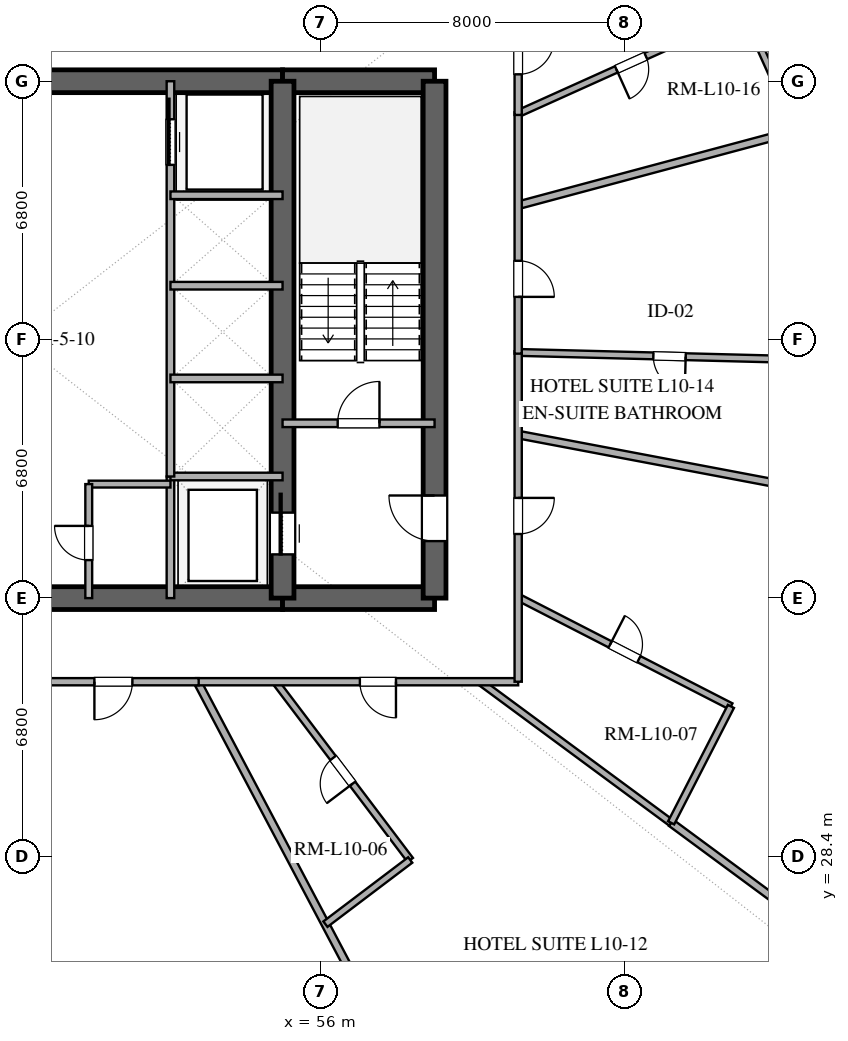
"""IFC4 building model, lengths in metres.
Left out: names, types, materials, properties, quantities, classifications, styles, units other than length and angle.
Written with IfcOpenShell. Run it as: python <this file> out.ifc"""

import sys

from ifc_helpers import new_model, si_unit, direction, frame, frame_2d, origin, place, context, subcontext, project, spatial, rectangle, extrude, element, fill, save


model = new_model("IFC4")
c1 = context("Model", 3, precision=1e-05, world=origin(), true_north=direction((0.0, 1.0)))
c2 = subcontext(c1, "Body", "Model", "MODEL_VIEW")
j1 = project(units=[si_unit("LENGTHUNIT", "METRE"), si_unit("PLANEANGLEUNIT", "RADIAN")], contexts=[c1])
p1 = place(None, origin())
s1 = spatial("IfcSite", under=j1, at=p1, CompositionType="ELEMENT")
p2 = place(p1, origin())
s2 = spatial("IfcBuilding", under=s1, at=p2, CompositionType="ELEMENT")
p3 = place(p2, frame((0.0, 0.0, 46.2)))
s3 = spatial("IfcBuildingStorey", under=s2, at=p3, CompositionType="ELEMENT", Elevation=46.2)
p4 = place(p3, frame((41.0, 35.2, 0.0), z_axis=(0.0, 0.0, 1.0), x_axis=(1.0, 0.0, 0.0)))
e1 = element("IfcWall", 1, at=p4, inside=s3, PredefinedType="SHEAR", context=c2, shape_type="SweptSolid", body=[
    extrude(rectangle(XDim=14.0, YDim=0.6, at=frame_2d((7.0, 0.0))), origin(), (0.0, 0.0, 1.0), 3.38),
])
p5 = place(p4, frame((6.1, 0.0, 0.0)))
e2 = element("IfcOpeningElement", 2, at=p5, cuts=e1, PredefinedType="OPENING", context=c2, shape_type="SweptSolid", body=[
    extrude(rectangle(XDim=1.8, YDim=2.25, at=frame_2d((0.9, 1.125))), frame((0.0, 0.31, 0.0), z_axis=(0.0, -1.0, 0.0), x_axis=(1.0, 0.0, 0.0)), (0.0, 0.0, 1.0), 0.62),
])
p6 = place(p3, frame((55.0, 35.2, 0.0), z_axis=(0.0, 0.0, 1.0), x_axis=(1.0, 0.0, 0.0)))
e3 = element("IfcWall", 3, at=p6, inside=s3, PredefinedType="SHEAR", context=c2, shape_type="SweptSolid", body=[
    extrude(rectangle(XDim=4.0, YDim=0.6, at=frame_2d((2.0, 0.0))), origin(), (0.0, 0.0, 1.0), 3.38),
])
p7 = place(p3, frame((41.0, 48.8, 0.0), z_axis=(0.0, 0.0, 1.0), x_axis=(1.0, 0.0, 0.0)))
e4 = element("IfcWall", 4, at=p7, inside=s3, PredefinedType="SHEAR", context=c2, shape_type="SweptSolid", body=[
    extrude(rectangle(XDim=14.0, YDim=0.6, at=frame_2d((7.0, 0.0))), origin(), (0.0, 0.0, 1.0), 3.38),
])
p8 = place(p7, frame((6.1, 0.0, 0.0)))
e5 = element("IfcOpeningElement", 5, at=p8, cuts=e4, PredefinedType="OPENING", context=c2, shape_type="SweptSolid", body=[
    extrude(rectangle(XDim=1.8, YDim=2.25, at=frame_2d((0.9, 1.125))), frame((0.0, 0.31, 0.0), z_axis=(0.0, -1.0, 0.0), x_axis=(1.0, 0.0, 0.0)), (0.0, 0.0, 1.0), 0.62),
])
p9 = place(p3, frame((55.0, 48.8, 0.0), z_axis=(0.0, 0.0, 1.0), x_axis=(1.0, 0.0, 0.0)))
e6 = element("IfcWall", 6, at=p9, inside=s3, PredefinedType="SHEAR", context=c2, shape_type="SweptSolid", body=[
    extrude(rectangle(XDim=4.0, YDim=0.6, at=frame_2d((2.0, 0.0))), origin(), (0.0, 0.0, 1.0), 3.38),
])
p10 = place(p3, frame((59.0, 35.2, 0.0), z_axis=(0.0, 0.0, 1.0), x_axis=(0.0, 1.0, 0.0)))
e7 = element("IfcWall", 7, at=p10, inside=s3, PredefinedType="SHEAR", context=c2, shape_type="SweptSolid", body=[
    extrude(rectangle(XDim=13.6, YDim=0.6, at=frame_2d((6.8, 0.0))), origin(), (0.0, 0.0, 1.0), 3.38),
])
p11 = place(p10, frame((1.5, 0.0, 0.0)))
e8 = element("IfcOpeningElement", 8, at=p11, cuts=e7, PredefinedType="OPENING", context=c2, shape_type="SweptSolid", body=[
    extrude(rectangle(XDim=1.2, YDim=2.15, at=frame_2d((0.6, 1.075))), frame((0.0, 0.31, 0.0), z_axis=(0.0, -1.0, 0.0), x_axis=(1.0, 0.0, 0.0)), (0.0, 0.0, 1.0), 0.62),
])
p12 = place(p3, frame((55.0, 35.2, 0.0), z_axis=(0.0, 0.0, 1.0), x_axis=(0.0, 1.0, 0.0)))
e9 = element("IfcWall", 9, at=p12, inside=s3, PredefinedType="SHEAR", context=c2, shape_type="SweptSolid", body=[
    extrude(rectangle(XDim=13.6, YDim=0.6, at=frame_2d((6.8, 0.0))), origin(), (0.0, 0.0, 1.0), 3.38),
])
p13 = place(p12, frame((1.15, 0.0, 0.0)))
e10 = element("IfcOpeningElement", 10, at=p13, cuts=e9, PredefinedType="OPENING", context=c2, shape_type="SweptSolid", body=[
    extrude(rectangle(XDim=1.1, YDim=2.2, at=frame_2d((0.55, 1.1))), frame((0.0, 0.31, 0.0), z_axis=(0.0, -1.0, 0.0), x_axis=(1.0, 0.0, 0.0)), (0.0, 0.0, 1.0), 0.62),
])
p14 = place(p3, frame((55.0, 39.8, 0.0), z_axis=(0.0, 0.0, 1.0), x_axis=(1.0, 0.0, 0.0)))
e11 = element("IfcWall", 11, at=p14, inside=s3, PredefinedType="SOLIDWALL", context=c2, shape_type="SweptSolid", body=[
    extrude(rectangle(XDim=4.0, YDim=0.2, at=frame_2d((2.0, 0.0))), origin(), (0.0, 0.0, 1.0), 2.74),
])
p15 = place(p14, frame((1.45, 0.0, 0.0)))
e12 = element("IfcOpeningElement", 12, at=p15, cuts=e11, PredefinedType="OPENING", context=c2, shape_type="SweptSolid", body=[
    extrude(rectangle(XDim=1.1, YDim=2.15, at=frame_2d((0.55, 1.075))), frame((0.0, 0.11, 0.0), z_axis=(0.0, -1.0, 0.0), x_axis=(1.0, 0.0, 0.0)), (0.0, 0.0, 1.0), 0.22),
])
p16 = place(p3, frame((52.05, 35.2, 0.0), z_axis=(0.0, 0.0, 1.0), x_axis=(0.0, 1.0, 0.0)))
e13 = element("IfcWall", 13, at=p16, inside=s3, PredefinedType="SOLIDWALL", context=c2, shape_type="SweptSolid", body=[
    extrude(rectangle(XDim=3.2, YDim=0.2, at=frame_2d((1.6, 0.0))), origin(), (0.0, 0.0, 1.0), 2.74),
])
p17 = place(p3, frame((52.05, 38.4, 0.0), z_axis=(0.0, 0.0, 1.0), x_axis=(1.0, 0.0, 0.0)))
e14 = element("IfcWall", 14, at=p17, inside=s3, PredefinedType="SOLIDWALL", context=c2, shape_type="SweptSolid", body=[
    extrude(rectangle(XDim=2.95, YDim=0.2, at=frame_2d((1.475, 0.0))), origin(), (0.0, 0.0, 1.0), 2.74),
])
p18 = place(p3, frame((52.05, 38.4, 0.0), z_axis=(0.0, 0.0, 1.0), x_axis=(0.0, 1.0, 0.0)))
e15 = element("IfcWall", 15, at=p18, inside=s3, PredefinedType="SOLIDWALL", context=c2, shape_type="SweptSolid", body=[
    extrude(rectangle(XDim=10.4, YDim=0.2, at=frame_2d((5.2, 0.0))), origin(), (0.0, 0.0, 1.0), 2.74),
])
p19 = place(p18, frame((8.2, 0.0, 0.0)))
e16 = element("IfcOpeningElement", 16, at=p19, cuts=e15, PredefinedType="OPENING", context=c2, shape_type="SweptSolid", body=[
    extrude(rectangle(XDim=1.2, YDim=2.2, at=frame_2d((0.6, 1.1))), frame((0.0, 0.11, 0.0), z_axis=(0.0, -1.0, 0.0), x_axis=(1.0, 0.0, 0.0)), (0.0, 0.0, 1.0), 0.22),
])
for number, where, z_axis, x_axis in (
    (17, (52.05, 40.98, 0.0), (0.0, 0.0, 1.0), (1.0, 0.0, 0.0)),
    (18, (52.05, 43.42, 0.0), (0.0, 0.0, 1.0), (1.0, 0.0, 0.0)),
    (19, (52.05, 45.8, 0.0), (0.0, 0.0, 1.0), (1.0, 0.0, 0.0)),
):
    element("IfcWall", number, at=place(p3, frame(where, z_axis=z_axis, x_axis=x_axis)), inside=s3, PredefinedType="SOLIDWALL", context=c2, shape_type="SweptSolid", body=[
        extrude(rectangle(XDim=2.95, YDim=0.2, at=frame_2d((1.475, 0.0))), origin(), (0.0, 0.0, 1.0), 2.74),
    ])
p20 = place(p3, frame((49.9, 38.2, 0.0), z_axis=(0.0, 0.0, 1.0), x_axis=(1.0, 0.0, 0.0)))
e20 = element("IfcWall", 20, at=p20, inside=s3, PredefinedType="PLUMBINGWALL", context=c2, shape_type="SweptSolid", body=[
    extrude(rectangle(XDim=2.15, YDim=0.18, at=frame_2d((1.075, 0.0))), origin(), (0.0, 0.0, 1.0), 2.74),
])
p21 = place(p3, frame((49.9, 35.2, 0.0), z_axis=(0.0, 0.0, 1.0), x_axis=(0.0, 1.0, 0.0)))
e21 = element("IfcWall", 21, at=p21, inside=s3, PredefinedType="PLUMBINGWALL", context=c2, shape_type="SweptSolid", body=[
    extrude(rectangle(XDim=3.0, YDim=0.18, at=frame_2d((1.5, 0.0))), origin(), (0.0, 0.0, 1.0), 2.74),
])
p22 = place(p21, frame((1.0, 0.0, 0.0)))
e22 = element("IfcOpeningElement", 22, at=p22, cuts=e21, PredefinedType="OPENING", context=c2, shape_type="SweptSolid", body=[
    extrude(rectangle(XDim=0.9, YDim=2.1, at=frame_2d((0.45, 1.05))), frame((0.0, 0.1, 0.0), z_axis=(0.0, -1.0, 0.0), x_axis=(1.0, 0.0, 0.0)), (0.0, 0.0, 1.0), 0.2),
])
p23 = place(p3, frame((48.893, 18.134, 0.0), z_axis=(0.0, 0.0, 1.0), x_axis=(-0.037384345878, 0.999300961014, 0.0)))
e23 = element("IfcWall", 23, at=p23, inside=s3, PredefinedType="PARTITIONING", context=c2, shape_type="SweptSolid", body=[
    extrude(rectangle(XDim=14.877, YDim=0.2, at=frame_2d((7.438, 0.0))), origin(), (0.0, 0.0, 1.0), 2.74),
])
p24 = place(p3, frame((61.2, 45.537, 0.0), z_axis=(0.0, 0.0, 1.0), x_axis=(0.965922233104, 0.258832454679, 0.0)))
e24 = element("IfcWall", 24, at=p24, inside=s3, PredefinedType="PARTITIONING", context=c2, shape_type="SweptSolid", body=[
    extrude(rectangle(XDim=16.377, YDim=0.2, at=frame_2d((8.189, 0.0))), origin(), (0.0, 0.0, 1.0), 2.74),
])
p25 = place(p3, frame((61.2, 39.502, 0.0), z_axis=(0.0, 0.0, 1.0), x_axis=(0.982565603173, -0.185916205484, 0.0)))
e25 = element("IfcWall", 25, at=p25, inside=s3, PredefinedType="PARTITIONING", context=c2, shape_type="SweptSolid", body=[
    extrude(rectangle(XDim=16.616, YDim=0.2, at=frame_2d((8.308, 0.0))), origin(), (0.0, 0.0, 1.0), 2.74),
])
p26 = place(p3, frame((69.165, 41.462, 0.0), z_axis=(0.0, 0.0, 1.0), x_axis=(-0.999676564425, 0.025431605115, 0.0)))
e26 = element("IfcWall", 26, at=p26, inside=s3, PredefinedType="PLUMBINGWALL", context=c2, shape_type="SweptSolid", body=[
    extrude(rectangle(XDim=7.968, YDim=0.18, at=frame_2d((3.984, 0.0))), origin(), (0.0, 0.0, 1.0), 2.74),
])
p27 = place(p26, frame((3.559, 0.0, 0.0)))
e27 = element("IfcOpeningElement", 27, at=p27, cuts=e26, PredefinedType="OPENING", context=c2, shape_type="SweptSolid", body=[
    extrude(rectangle(XDim=0.85, YDim=2.1, at=frame_2d((0.425, 1.05))), frame((0.0, 0.1, 0.0), z_axis=(0.0, -1.0, 0.0), x_axis=(1.0, 0.0, 0.0)), (0.0, 0.0, 1.0), 0.2),
])
p28 = place(p3, frame((52.757, 33.0, 0.0), z_axis=(0.0, 0.0, 1.0), x_axis=(0.467270516294, -0.884114395654, 0.0)))
e28 = element("IfcWall", 28, at=p28, inside=s3, PredefinedType="PARTITIONING", context=c2, shape_type="SweptSolid", body=[
    extrude(rectangle(XDim=14.96, YDim=0.2, at=frame_2d((7.48, 0.0))), origin(), (0.0, 0.0, 1.0), 2.74),
])
p29 = place(p3, frame((70.538, 25.366, 0.0), z_axis=(0.0, 0.0, 1.0), x_axis=(-0.804616980297, 0.593794168898, 0.0)))
e29 = element("IfcWall", 29, at=p29, inside=s3, PredefinedType="PARTITIONING", context=c2, shape_type="SweptSolid", body=[
    extrude(rectangle(XDim=6.603, YDim=0.2, at=frame_2d((3.302, 0.0))), origin(), (0.0, 0.0, 1.0), 2.74),
])
p30 = place(p3, frame((67.143, 50.626, 0.0), z_axis=(0.0, 0.0, 1.0), x_axis=(-0.911702033518, -0.410852044025, 0.0)))
e30 = element("IfcWall", 30, at=p30, inside=s3, PredefinedType="PLUMBINGWALL", context=c2, shape_type="SweptSolid", body=[
    extrude(rectangle(XDim=6.519, YDim=0.18, at=frame_2d((3.259, 0.0))), origin(), (0.0, 0.0, 1.0), 2.74),
])
p31 = place(p30, frame((2.834, 0.0, 0.0)))
e31 = element("IfcOpeningElement", 31, at=p31, cuts=e30, PredefinedType="OPENING", context=c2, shape_type="SweptSolid", body=[
    extrude(rectangle(XDim=0.85, YDim=2.1, at=frame_2d((0.425, 1.05))), frame((0.0, 0.1, 0.0), z_axis=(0.0, -1.0, 0.0), x_axis=(1.0, 0.0, 0.0)), (0.0, 0.0, 1.0), 0.2),
])
p32 = place(p3, frame((61.2, 35.224, 0.0), z_axis=(0.0, 0.0, 1.0), x_axis=(0.889651376734, -0.456640370395, 0.0)))
e32 = element("IfcWall", 32, at=p32, inside=s3, PredefinedType="PLUMBINGWALL", context=c2, shape_type="SweptSolid", body=[
    extrude(rectangle(XDim=6.292, YDim=0.18, at=frame_2d((3.146, 0.0))), origin(), (0.0, 0.0, 1.0), 2.74),
])
p33 = place(p32, frame((2.721, 0.0, 0.0)))
e33 = element("IfcOpeningElement", 33, at=p33, cuts=e32, PredefinedType="OPENING", context=c2, shape_type="SweptSolid", body=[
    extrude(rectangle(XDim=0.85, YDim=2.1, at=frame_2d((0.425, 1.05))), frame((0.0, 0.1, 0.0), z_axis=(0.0, -1.0, 0.0), x_axis=(1.0, 0.0, 0.0)), (0.0, 0.0, 1.0), 0.2),
])
p34 = place(p3, frame((65.225, 29.287, 0.0), z_axis=(0.0, 0.0, 1.0), x_axis=(-0.804582519588, 0.593840861825, 0.0)))
e34 = element("IfcWall", 34, at=p34, inside=s3, PredefinedType="PLUMBINGWALL", context=c2, shape_type="SweptSolid", body=[
    extrude(rectangle(XDim=6.252, YDim=0.18, at=frame_2d((3.126, 0.0))), origin(), (0.0, 0.0, 1.0), 2.74),
])
p35 = place(p3, frame((58.36, 28.309, 0.0), z_axis=(0.0, 0.0, 1.0), x_axis=(-0.603401299207, 0.797437691682, 0.0)))
e35 = element("IfcWall", 35, at=p35, inside=s3, PredefinedType="PLUMBINGWALL", context=c2, shape_type="SweptSolid", body=[
    extrude(rectangle(XDim=5.882, YDim=0.18, at=frame_2d((2.941, 0.0))), origin(), (0.0, 0.0, 1.0), 2.74),
])
p36 = place(p35, frame((2.516, 0.0, 0.0)))
e36 = element("IfcOpeningElement", 36, at=p36, cuts=e35, PredefinedType="OPENING", context=c2, shape_type="SweptSolid", body=[
    extrude(rectangle(XDim=0.85, YDim=2.1, at=frame_2d((0.425, 1.05))), frame((0.0, 0.1, 0.0), z_axis=(0.0, -1.0, 0.0), x_axis=(1.0, 0.0, 0.0)), (0.0, 0.0, 1.0), 0.2),
])
p37 = place(p3, frame((61.2, 33.0, 0.0), z_axis=(0.0, 0.0, 1.0), x_axis=(-1.0, 0.0, 0.0)))
e37 = element("IfcWall", 37, at=p37, inside=s3, PredefinedType="PARTITIONING", context=c2, shape_type="SweptSolid", body=[
    extrude(rectangle(XDim=8.479, YDim=0.19, at=frame_2d((4.24, 0.0))), origin(), (0.0, 0.0, 1.0), 2.74),
])
p38 = place(p37, frame((3.216, 0.0, 0.0)))
e38 = element("IfcOpeningElement", 38, at=p38, cuts=e37, PredefinedType="OPENING", context=c2, shape_type="SweptSolid", body=[
    extrude(rectangle(XDim=0.95, YDim=2.15, at=frame_2d((0.475, 1.075))), frame((0.0, 0.105, 0.0), z_axis=(0.0, -1.0, 0.0), x_axis=(1.0, 0.0, 0.0)), (0.0, 0.0, 1.0), 0.21),
])
p39 = place(p3, frame((52.793, 33.0, 0.0), z_axis=(0.0, 0.0, 1.0), x_axis=(-1.0, 0.0, 0.0)))
e39 = element("IfcWall", 39, at=p39, inside=s3, PredefinedType="PARTITIONING", context=c2, shape_type="SweptSolid", body=[
    extrude(rectangle(XDim=8.754, YDim=0.19, at=frame_2d((4.377, 0.0))), origin(), (0.0, 0.0, 1.0), 2.74),
])
p40 = place(p39, frame((1.744, 0.0, 0.0)))
e40 = element("IfcOpeningElement", 40, at=p40, cuts=e39, PredefinedType="OPENING", context=c2, shape_type="SweptSolid", body=[
    extrude(rectangle(XDim=1.0, YDim=2.2, at=frame_2d((0.5, 1.1))), frame((0.0, 0.105, 0.0), z_axis=(0.0, -1.0, 0.0), x_axis=(1.0, 0.0, 0.0)), (0.0, 0.0, 1.0), 0.21),
])
p41 = place(p39, frame((5.298, 0.0, 0.0)))
e41 = element("IfcOpeningElement", 41, at=p41, cuts=e39, PredefinedType="OPENING", context=c2, shape_type="SweptSolid", body=[
    extrude(rectangle(XDim=0.95, YDim=2.15, at=frame_2d((0.475, 1.075))), frame((0.0, 0.105, 0.0), z_axis=(0.0, -1.0, 0.0), x_axis=(1.0, 0.0, 0.0)), (0.0, 0.0, 1.0), 0.21),
])
p42 = place(p3, frame((61.2, 41.696, 0.0), z_axis=(0.0, 0.0, 1.0), x_axis=(0.0, -1.0, 0.0)))
e42 = element("IfcWall", 42, at=p42, inside=s3, PredefinedType="PARTITIONING", context=c2, shape_type="SweptSolid", body=[
    extrude(rectangle(XDim=8.696, YDim=0.19, at=frame_2d((4.348, 0.0))), origin(), (0.0, 0.0, 1.0), 2.74),
])
p43 = place(p42, frame((3.86, 0.0, 0.0)))
e43 = element("IfcOpeningElement", 43, at=p43, cuts=e42, PredefinedType="OPENING", context=c2, shape_type="SweptSolid", body=[
    extrude(rectangle(XDim=0.95, YDim=2.15, at=frame_2d((0.475, 1.075))), frame((0.0, 0.105, 0.0), z_axis=(0.0, -1.0, 0.0), x_axis=(1.0, 0.0, 0.0)), (0.0, 0.0, 1.0), 0.21),
])
p44 = place(p3, frame((61.2, 47.983, 0.0), z_axis=(0.0, 0.0, 1.0), x_axis=(0.0, -1.0, 0.0)))
e44 = element("IfcWall", 44, at=p44, inside=s3, PredefinedType="PARTITIONING", context=c2, shape_type="SweptSolid", body=[
    extrude(rectangle(XDim=6.351, YDim=0.19, at=frame_2d((3.176, 0.0))), origin(), (0.0, 0.0, 1.0), 2.74),
])
p45 = place(p44, frame((3.907, 0.0, 0.0)))
e45 = element("IfcOpeningElement", 45, at=p45, cuts=e44, PredefinedType="OPENING", context=c2, shape_type="SweptSolid", body=[
    extrude(rectangle(XDim=0.95, YDim=2.15, at=frame_2d((0.475, 1.075))), frame((0.0, 0.105, 0.0), z_axis=(0.0, -1.0, 0.0), x_axis=(1.0, 0.0, 0.0)), (0.0, 0.0, 1.0), 0.21),
])
p46 = place(p3, frame((66.798, 32.351, 0.0), z_axis=(0.0, 0.0, 1.0), x_axis=(-0.456659133546, -0.889641745732, 0.0)))
e46 = element("IfcWall", 46, at=p46, inside=s3, PredefinedType="PLUMBINGWALL", context=c2, shape_type="SweptSolid", body=[
    extrude(rectangle(XDim=3.444, YDim=0.18, at=frame_2d((1.722, 0.0))), origin(), (0.0, 0.0, 1.0), 2.74),
])
p47 = place(p3, frame((68.549, 47.506, 0.0), z_axis=(0.0, 0.0, 1.0), x_axis=(-0.410839223928, 0.911707810695, 0.0)))
e47 = element("IfcWall", 47, at=p47, inside=s3, PredefinedType="PLUMBINGWALL", context=c2, shape_type="SweptSolid", body=[
    extrude(rectangle(XDim=3.422, YDim=0.18, at=frame_2d((1.711, 0.0))), origin(), (0.0, 0.0, 1.0), 2.74),
])
p48 = place(p3, frame((61.2, 51.0, 0.0), z_axis=(0.0, 0.0, 1.0), x_axis=(0.0, -1.0, 0.0)))
e48 = element("IfcWall", 48, at=p48, inside=s3, PredefinedType="PARTITIONING", context=c2, shape_type="SweptSolid", body=[
    extrude(rectangle(XDim=3.087, YDim=0.19, at=frame_2d((1.543, 0.0))), origin(), (0.0, 0.0, 1.0), 2.74),
])
p49 = place(p48, frame((1.069, 0.0, 0.0)))
e49 = element("IfcOpeningElement", 49, at=p49, cuts=e48, PredefinedType="OPENING", context=c2, shape_type="SweptSolid", body=[
    extrude(rectangle(XDim=0.95, YDim=2.15, at=frame_2d((0.475, 1.075))), frame((0.0, 0.105, 0.0), z_axis=(0.0, -1.0, 0.0), x_axis=(1.0, 0.0, 0.0)), (0.0, 0.0, 1.0), 0.21),
])
p50 = place(p3, frame((56.128, 26.621, 0.0), z_axis=(0.0, 0.0, 1.0), x_axis=(0.797438154909, 0.603400687019, 0.0)))
e50 = element("IfcWall", 50, at=p50, inside=s3, PredefinedType="PLUMBINGWALL", context=c2, shape_type="SweptSolid", body=[
    extrude(rectangle(XDim=2.798, YDim=0.18, at=frame_2d((1.399, 0.0))), origin(), (0.0, 0.0, 1.0), 2.74),
])
p51 = place(p13, origin())
e51 = element("IfcDoor", 51, at=p51, inside=s3, OperationType="SLIDING_TO_RIGHT", PredefinedType="DOOR", context=c2, shape_type="SweptSolid", body=[
    extrude(rectangle(XDim=1.1, YDim=2.2, at=frame_2d((0.55, 1.1))), frame((0.0, 0.025, 0.0), z_axis=(0.0, -1.0, 0.0), x_axis=(1.0, 0.0, 0.0)), (0.0, 0.0, 1.0), 0.05),
])
fill(e10, e51)
p52 = place(p11, origin())
e52 = element("IfcDoor", 52, at=p52, inside=s3, OperationType="SINGLE_SWING_RIGHT", PredefinedType="DOOR", context=c2, shape_type="SweptSolid", body=[
    extrude(rectangle(XDim=1.2, YDim=2.15, at=frame_2d((0.6, 1.075))), frame((0.0, 0.025, 0.0), z_axis=(0.0, -1.0, 0.0), x_axis=(1.0, 0.0, 0.0)), (0.0, 0.0, 1.0), 0.05),
])
fill(e8, e52)
p53 = place(p15, origin())
e53 = element("IfcDoor", 53, at=p53, inside=s3, OperationType="SINGLE_SWING_RIGHT", PredefinedType="DOOR", context=c2, shape_type="SweptSolid", body=[
    extrude(rectangle(XDim=1.1, YDim=2.15, at=frame_2d((0.55, 1.075))), frame((0.0, 0.025, 0.0), z_axis=(0.0, -1.0, 0.0), x_axis=(1.0, 0.0, 0.0)), (0.0, 0.0, 1.0), 0.05),
])
fill(e12, e53)
p54 = place(p19, origin())
e54 = element("IfcDoor", 54, at=p54, inside=s3, OperationType="SLIDING_TO_RIGHT", PredefinedType="DOOR", context=c2, shape_type="SweptSolid", body=[
    extrude(rectangle(XDim=1.2, YDim=2.2, at=frame_2d((0.6, 1.1))), frame((0.0, 0.025, 0.0), z_axis=(0.0, -1.0, 0.0), x_axis=(1.0, 0.0, 0.0)), (0.0, 0.0, 1.0), 0.05),
])
fill(e16, e54)
p55 = place(p22, origin())
e55 = element("IfcDoor", 55, at=p55, inside=s3, OperationType="SINGLE_SWING_RIGHT", PredefinedType="DOOR", context=c2, shape_type="SweptSolid", body=[
    extrude(rectangle(XDim=0.9, YDim=2.1, at=frame_2d((0.45, 1.05))), frame((0.0, 0.025, 0.0), z_axis=(0.0, -1.0, 0.0), x_axis=(1.0, 0.0, 0.0)), (0.0, 0.0, 1.0), 0.05),
])
fill(e22, e55)
p56 = place(p27, origin())
e56 = element("IfcDoor", 56, at=p56, inside=s3, OperationType="SINGLE_SWING_LEFT", PredefinedType="DOOR", context=c2, shape_type="SweptSolid", body=[
    extrude(rectangle(XDim=0.85, YDim=2.1, at=frame_2d((0.425, 1.05))), frame((0.0, 0.025, 0.0), z_axis=(0.0, -1.0, 0.0), x_axis=(1.0, 0.0, 0.0)), (0.0, 0.0, 1.0), 0.05),
])
fill(e27, e56)
p57 = place(p31, origin())
e57 = element("IfcDoor", 57, at=p57, inside=s3, OperationType="SINGLE_SWING_RIGHT", PredefinedType="DOOR", context=c2, shape_type="SweptSolid", body=[
    extrude(rectangle(XDim=0.85, YDim=2.1, at=frame_2d((0.425, 1.05))), frame((0.0, 0.025, 0.0), z_axis=(0.0, -1.0, 0.0), x_axis=(1.0, 0.0, 0.0)), (0.0, 0.0, 1.0), 0.05),
])
fill(e31, e57)
p58 = place(p33, origin())
e58 = element("IfcDoor", 58, at=p58, inside=s3, OperationType="SINGLE_SWING_LEFT", PredefinedType="DOOR", context=c2, shape_type="SweptSolid", body=[
    extrude(rectangle(XDim=0.85, YDim=2.1, at=frame_2d((0.425, 1.05))), frame((0.0, 0.025, 0.0), z_axis=(0.0, -1.0, 0.0), x_axis=(1.0, 0.0, 0.0)), (0.0, 0.0, 1.0), 0.05),
])
fill(e33, e58)
p59 = place(p36, origin())
e59 = element("IfcDoor", 59, at=p59, inside=s3, OperationType="SINGLE_SWING_LEFT", PredefinedType="DOOR", context=c2, shape_type="SweptSolid", body=[
    extrude(rectangle(XDim=0.85, YDim=2.1, at=frame_2d((0.425, 1.05))), frame((0.0, 0.025, 0.0), z_axis=(0.0, -1.0, 0.0), x_axis=(1.0, 0.0, 0.0)), (0.0, 0.0, 1.0), 0.05),
])
fill(e36, e59)
p60 = place(p38, origin())
e60 = element("IfcDoor", 60, at=p60, inside=s3, OperationType="SINGLE_SWING_LEFT", PredefinedType="DOOR", context=c2, shape_type="SweptSolid", body=[
    extrude(rectangle(XDim=0.95, YDim=2.15, at=frame_2d((0.475, 1.075))), frame((0.0, 0.025, 0.0), z_axis=(0.0, -1.0, 0.0), x_axis=(1.0, 0.0, 0.0)), (0.0, 0.0, 1.0), 0.05),
])
fill(e38, e60)
p61 = place(p40, origin())
e61 = element("IfcDoor", 61, at=p61, inside=s3, OperationType="SINGLE_SWING_RIGHT", PredefinedType="DOOR", context=c2, shape_type="SweptSolid", body=[
    extrude(rectangle(XDim=1.0, YDim=2.2, at=frame_2d((0.5, 1.1))), frame((0.0, 0.025, 0.0), z_axis=(0.0, -1.0, 0.0), x_axis=(1.0, 0.0, 0.0)), (0.0, 0.0, 1.0), 0.05),
])
fill(e40, e61)
p62 = place(p43, origin())
e62 = element("IfcDoor", 62, at=p62, inside=s3, OperationType="SINGLE_SWING_LEFT", PredefinedType="DOOR", context=c2, shape_type="SweptSolid", body=[
    extrude(rectangle(XDim=0.95, YDim=2.15, at=frame_2d((0.475, 1.075))), frame((0.0, 0.025, 0.0), z_axis=(0.0, -1.0, 0.0), x_axis=(1.0, 0.0, 0.0)), (0.0, 0.0, 1.0), 0.05),
])
fill(e43, e62)
p63 = place(p45, origin())
e63 = element("IfcDoor", 63, at=p63, inside=s3, OperationType="SINGLE_SWING_RIGHT", PredefinedType="DOOR", context=c2, shape_type="SweptSolid", body=[
    extrude(rectangle(XDim=0.95, YDim=2.15, at=frame_2d((0.475, 1.075))), frame((0.0, 0.025, 0.0), z_axis=(0.0, -1.0, 0.0), x_axis=(1.0, 0.0, 0.0)), (0.0, 0.0, 1.0), 0.05),
])
fill(e45, e63)
p64 = place(p49, origin())
e64 = element("IfcDoor", 64, at=p64, inside=s3, OperationType="SINGLE_SWING_LEFT", PredefinedType="DOOR", context=c2, shape_type="SweptSolid", body=[
    extrude(rectangle(XDim=0.95, YDim=2.15, at=frame_2d((0.475, 1.075))), frame((0.0, 0.025, 0.0), z_axis=(0.0, -1.0, 0.0), x_axis=(1.0, 0.0, 0.0)), (0.0, 0.0, 1.0), 0.05),
])
fill(e49, e64)
save(model, sys.argv[1])
